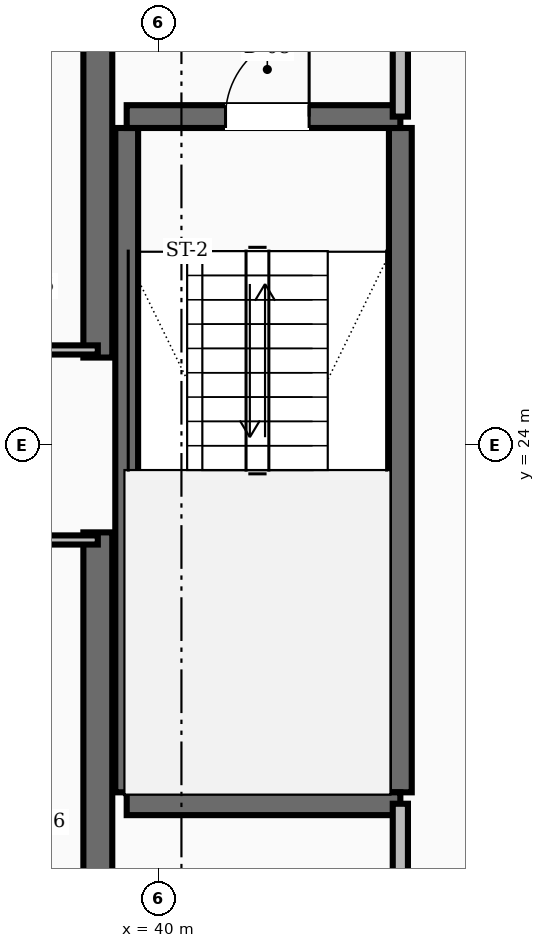
"""IFC4 building model, lengths in metres.
Left out: names, types, materials, properties, quantities, classifications, styles, units other than length and angle.
Written with IfcOpenShell. Run it as: python <this file> out.ifc"""

import sys

from ifc_helpers import new_model, si_unit, direction, frame, frame_2d, origin, place, context, subcontext, project, spatial, rectangle, extrude, element, fill, save


model = new_model("IFC4")
c1 = context("Model", 3, precision=1e-05, world=origin(), true_north=direction((0.0, 1.0)))
c2 = subcontext(c1, "Body", "Model", "MODEL_VIEW")
j1 = project(units=[si_unit("LENGTHUNIT", "METRE"), si_unit("PLANEANGLEUNIT", "RADIAN")], contexts=[c1])
p1 = place(None, origin())
s1 = spatial("IfcSite", under=j1, at=p1, CompositionType="ELEMENT")
p2 = place(p1, origin())
s2 = spatial("IfcBuilding", under=s1, at=p2, CompositionType="ELEMENT")
p3 = place(p2, frame((0.0, 0.0, 66.4)))
s3 = spatial("IfcBuildingStorey", under=s2, at=p3, CompositionType="ELEMENT", Elevation=66.4)
for number, where, z_axis, x_axis in (
    (1, (39.2, 16.55, 0.0), (0.0, 0.0, 1.0), (0.0, 1.0, 0.0)),
    (2, (39.2, 25.15, 0.0), (0.0, 0.0, 1.0), (0.0, 1.0, 0.0)),
):
    element("IfcWall", number, at=place(p3, frame(where, z_axis=z_axis, x_axis=x_axis)), inside=s3, PredefinedType="SHEAR", context=c2, shape_type="SweptSolid", body=[
        extrude(rectangle(XDim=6.3, YDim=0.38, at=frame_2d((3.15, 0.0))), origin(), (0.0, 0.0, 1.0), 3.6),
    ])
for number, where, z_axis, x_axis in (
    (3, (43.18, 19.43, 0.0), (0.0, 0.0, 1.0), (0.0, 1.0, 0.0)),
    (4, (39.58, 19.43, 0.0), (0.0, 0.0, 1.0), (0.0, 1.0, 0.0)),
):
    element("IfcWall", number, at=place(p3, frame(where, z_axis=z_axis, x_axis=x_axis)), inside=s3, PredefinedType="SHEAR", context=c2, shape_type="SweptSolid", body=[
        extrude(rectangle(XDim=8.74, YDim=0.3, at=frame_2d((4.37, 0.0))), origin(), (0.0, 0.0, 1.0), 3.6),
    ])
p4 = place(p3, frame((39.58, 19.28, 0.0), z_axis=(0.0, 0.0, 1.0), x_axis=(1.0, 0.0, 0.0)))
e5 = element("IfcWall", 5, at=p4, inside=s3, PredefinedType="SHEAR", context=c2, shape_type="SweptSolid", body=[
    extrude(rectangle(XDim=3.6, YDim=0.3, at=frame_2d((1.8, 0.0))), origin(), (0.0, 0.0, 1.0), 3.6),
])
p5 = place(p3, frame((39.58, 28.32, 0.0), z_axis=(0.0, 0.0, 1.0), x_axis=(1.0, 0.0, 0.0)))
e6 = element("IfcWall", 6, at=p5, inside=s3, PredefinedType="SHEAR", context=c2, shape_type="SweptSolid", body=[
    extrude(rectangle(XDim=3.6, YDim=0.3, at=frame_2d((1.8, 0.0))), origin(), (0.0, 0.0, 1.0), 3.6),
])
p6 = place(p5, frame((1.3, 0.0, 0.0)))
e7 = element("IfcOpeningElement", 7, at=p6, cuts=e6, PredefinedType="OPENING", context=c2, shape_type="SweptSolid", body=[
    extrude(rectangle(XDim=1.1, YDim=2.1, at=frame_2d((0.55, 1.05))), frame((0.0, 0.16, 0.0), z_axis=(0.0, -1.0, 0.0), x_axis=(1.0, 0.0, 0.0)), (0.0, 0.0, 1.0), 0.32),
])
p7 = place(p3, frame((43.18, 28.32, 0.0), z_axis=(0.0, 0.0, 1.0), x_axis=(0.0, 1.0, 0.0)))
e8 = element("IfcWall", 8, at=p7, inside=s3, PredefinedType="SOLIDWALL", context=c2, shape_type="SweptSolid", body=[
    extrude(rectangle(XDim=3.13, YDim=0.2, at=frame_2d((1.565, 0.0))), origin(), (0.0, 0.0, 1.0), 2.71),
])
p8 = place(p7, frame((1.015, 0.0, 0.0)))
e9 = element("IfcOpeningElement", 9, at=p8, cuts=e8, PredefinedType="OPENING", context=c2, shape_type="SweptSolid", body=[
    extrude(rectangle(XDim=1.1, YDim=2.1, at=frame_2d((0.55, 1.05))), frame((0.0, 0.11, 0.0), z_axis=(0.0, -1.0, 0.0), x_axis=(1.0, 0.0, 0.0)), (0.0, 0.0, 1.0), 0.22),
])
p9 = place(p3, frame((43.18, 16.55, 0.0), z_axis=(0.0, 0.0, 1.0), x_axis=(0.0, 1.0, 0.0)))
e10 = element("IfcWall", 10, at=p9, inside=s3, PredefinedType="SOLIDWALL", context=c2, shape_type="SweptSolid", body=[
    extrude(rectangle(XDim=2.73, YDim=0.2, at=frame_2d((1.365, 0.0))), origin(), (0.0, 0.0, 1.0), 2.71),
])
p10 = place(p9, frame((0.89, 0.0, 0.0)))
e11 = element("IfcOpeningElement", 11, at=p10, cuts=e10, PredefinedType="OPENING", context=c2, shape_type="SweptSolid", body=[
    extrude(rectangle(XDim=0.95, YDim=2.1, at=frame_2d((0.475, 1.05))), frame((0.0, 0.11, 0.0), z_axis=(0.0, -1.0, 0.0), x_axis=(1.0, 0.0, 0.0)), (0.0, 0.0, 1.0), 0.22),
])
for number, where, z_axis, x_axis in (
    (12, (37.4, 25.25, 0.0), (0.0, 0.0, 1.0), (1.0, 0.0, 0.0)),
    (13, (37.4, 22.75, 0.0), (0.0, 0.0, 1.0), (1.0, 0.0, 0.0)),
):
    element("IfcWall", number, at=place(p3, frame(where, z_axis=z_axis, x_axis=x_axis)), inside=s3, PredefinedType="PARTITIONING", context=c2, shape_type="SweptSolid", body=[
        extrude(rectangle(XDim=1.8, YDim=0.12, at=frame_2d((0.9, 0.0))), origin(), (0.0, 0.0, 1.0), 2.71),
    ])
p11 = place(p6, origin())
e14 = element("IfcDoor", 14, at=p11, inside=s3, OperationType="SINGLE_SWING_RIGHT", PredefinedType="DOOR", context=c2, shape_type="SweptSolid", body=[
    extrude(rectangle(XDim=1.1, YDim=2.1, at=frame_2d((0.55, 1.05))), frame((0.0, 0.025, 0.0), z_axis=(0.0, -1.0, 0.0), x_axis=(1.0, 0.0, 0.0)), (0.0, 0.0, 1.0), 0.05),
])
fill(e7, e14)
save(model, sys.argv[1])
